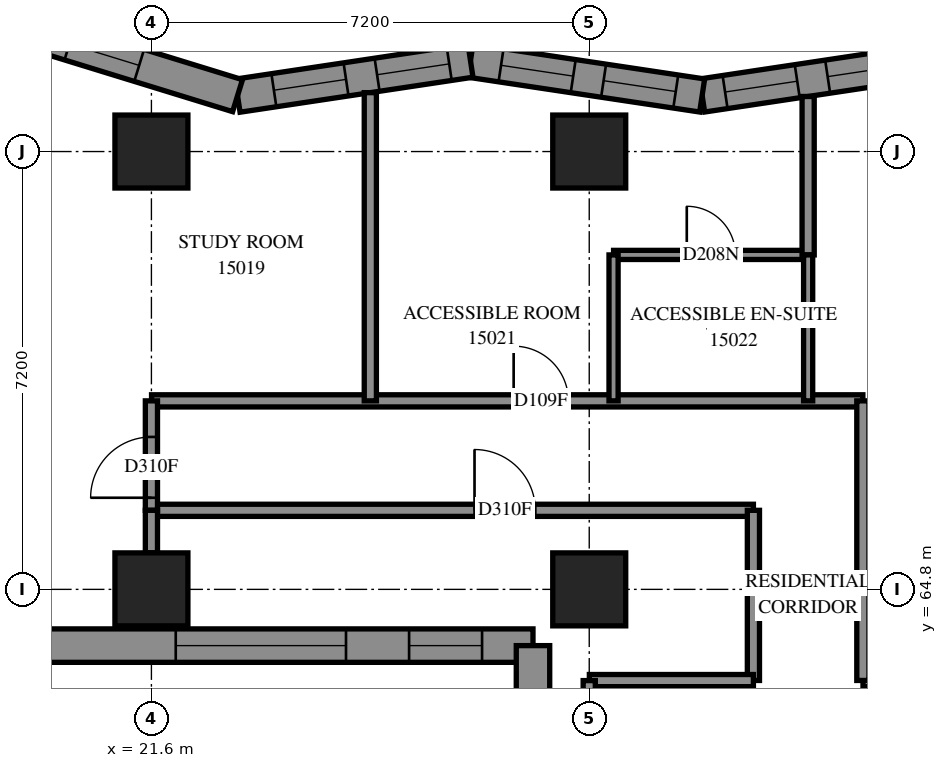
"""IFC4 building model, lengths in metres.
Left out: names, types, materials, properties, quantities, classifications, styles, units other than length and angle.
Written with IfcOpenShell. Run it as: python <this file> out.ifc"""

import sys

from ifc_helpers import new_model, si_unit, direction, frame, frame_2d, origin, origin_2d, place, context, subcontext, project, spatial, polyline, rectangle, outline, extrude, element, fill, save


model = new_model("IFC4")
c1 = context("Model", 3, precision=1e-05, world=origin(), true_north=direction((0.0, 1.0)))
c2 = subcontext(c1, "Body", "Model", "MODEL_VIEW")
j1 = project(units=[si_unit("LENGTHUNIT", "METRE"), si_unit("PLANEANGLEUNIT", "RADIAN")], contexts=[c1])
p1 = place(None, origin())
s1 = spatial("IfcSite", under=j1, at=p1, CompositionType="ELEMENT")
p2 = place(p1, origin())
s2 = spatial("IfcBuilding", under=s1, at=p2, CompositionType="ELEMENT")
p3 = place(p2, frame((0.0, 0.0, 57.6)))
s3 = spatial("IfcBuildingStorey", under=s2, at=p3, CompositionType="ELEMENT", Elevation=57.6)
for number, where, z_axis, x_axis in (
    (1, (21.6, 64.8, 0.0), (0.0, 0.0, 1.0), (1.0, 0.0, 0.0)),
    (2, (21.6, 72.0, 0.0), (0.0, 0.0, 1.0), (1.0, 0.0, 0.0)),
    (3, (28.8, 64.8, 0.0), (0.0, 0.0, 1.0), (1.0, 0.0, 0.0)),
    (4, (28.8, 72.0, 0.0), (0.0, 0.0, 1.0), (1.0, 0.0, 0.0)),
):
    element("IfcColumn", number, at=place(p3, frame(where, z_axis=z_axis, x_axis=x_axis)), inside=s3, PredefinedType="COLUMN", context=c2, shape_type="SweptSolid", body=[
        extrude(rectangle(XDim=1.2, YDim=1.2, at=origin_2d()), origin(), (0.0, 0.0, 1.0), 3.1),
    ])
p4 = place(p3, frame((34.467, 73.494, 0.0), z_axis=(0.0, 0.0, 1.0), x_axis=(-0.9889150173, -0.1484826202, 0.0)))
e5 = element("IfcWall", 5, at=p4, inside=s3, PredefinedType="SOLIDWALL", context=c2, shape_type="SweptSolid", body=[
    extrude(outline(polyline([(-0.041, -0.275), (3.811, -0.275), (3.894, 0.275), (0.041, 0.275), (-0.041, -0.275)])), origin(), (0.0, 0.0, 1.0), 3.1),
])
p5 = place(p4, frame((0.566, 0.0, 0.5)))
e6 = element("IfcOpeningElement", 6, at=p5, cuts=e5, PredefinedType="OPENING", context=c2, shape_type="SweptSolid", body=[
    extrude(rectangle(XDim=1.2, YDim=2.45, at=frame_2d((0.6, 1.225))), frame((0.0, 0.285, 0.0), z_axis=(0.0, -1.0, 0.0), x_axis=(1.0, 0.0, 0.0)), (0.0, 0.0, 1.0), 0.57),
])
p6 = place(p4, frame((2.271, 0.0, 0.5)))
e7 = element("IfcOpeningElement", 7, at=p6, cuts=e5, PredefinedType="OPENING", context=c2, shape_type="SweptSolid", body=[
    extrude(rectangle(XDim=1.2, YDim=2.45, at=frame_2d((0.6, 1.225))), frame((0.0, 0.285, 0.0), z_axis=(0.0, -1.0, 0.0), x_axis=(1.0, 0.0, 0.0)), (0.0, 0.0, 1.0), 0.57),
])
p7 = place(p3, frame((30.657, 72.922, 0.0), z_axis=(0.0, 0.0, 1.0), x_axis=(-0.9889155896, 0.1484788086, 0.0)))
e8 = element("IfcWall", 8, at=p7, inside=s3, PredefinedType="SOLIDWALL", context=c2, shape_type="SweptSolid", body=[
    extrude(outline(polyline([(0.041, -0.275), (3.894, -0.275), (3.811, 0.275), (-0.041, 0.275), (0.041, -0.275)])), origin(), (0.0, 0.0, 1.0), 3.1),
])
p8 = place(p7, frame((0.439, 0.0, 0.5)))
e9 = element("IfcOpeningElement", 9, at=p8, cuts=e8, PredefinedType="OPENING", context=c2, shape_type="SweptSolid", body=[
    extrude(rectangle(XDim=1.2, YDim=2.45, at=frame_2d((0.6, 1.225))), frame((0.0, 0.285, 0.0), z_axis=(0.0, -1.0, 0.0), x_axis=(1.0, 0.0, 0.0)), (0.0, 0.0, 1.0), 0.57),
])
p9 = place(p7, frame((2.144, 0.0, 0.5)))
e10 = element("IfcOpeningElement", 10, at=p9, cuts=e8, PredefinedType="OPENING", context=c2, shape_type="SweptSolid", body=[
    extrude(rectangle(XDim=1.2, YDim=2.45, at=frame_2d((0.6, 1.225))), frame((0.0, 0.285, 0.0), z_axis=(0.0, -1.0, 0.0), x_axis=(1.0, 0.0, 0.0)), (0.0, 0.0, 1.0), 0.57),
])
p10 = place(p3, frame((26.847, 73.494, 0.0), z_axis=(0.0, 0.0, 1.0), x_axis=(-0.9889175987, -0.1484654269, 0.0)))
e11 = element("IfcWall", 11, at=p10, inside=s3, PredefinedType="SOLIDWALL", context=c2, shape_type="SweptSolid", body=[
    extrude(outline(polyline([(-0.041, -0.275), (3.811, -0.275), (3.936, 0.275), (0.041, 0.275), (-0.041, -0.275)])), origin(), (0.0, 0.0, 1.0), 3.1),
])
p11 = place(p10, frame((0.353, 0.0, 0.5)))
e12 = element("IfcOpeningElement", 12, at=p11, cuts=e11, PredefinedType="OPENING", context=c2, shape_type="SweptSolid", body=[
    extrude(rectangle(XDim=1.2, YDim=2.45, at=frame_2d((0.6, 1.225))), frame((0.0, 0.285, 0.0), z_axis=(0.0, -1.0, 0.0), x_axis=(1.0, 0.0, 0.0)), (0.0, 0.0, 1.0), 0.57),
])
p12 = place(p10, frame((2.07, 0.0, 0.5)))
e13 = element("IfcOpeningElement", 13, at=p12, cuts=e11, PredefinedType="OPENING", context=c2, shape_type="SweptSolid", body=[
    extrude(rectangle(XDim=1.2, YDim=2.45, at=frame_2d((0.6, 1.225))), frame((0.0, 0.285, 0.0), z_axis=(0.0, -1.0, 0.0), x_axis=(1.0, 0.0, 0.0)), (0.0, 0.0, 1.0), 0.57),
])
p13 = place(p3, frame((23.017, 72.919, 0.0), z_axis=(0.0, 0.0, 1.0), x_axis=(-0.9557948878, 0.2940342368, 0.0)))
e14 = element("IfcWall", 14, at=p13, inside=s3, PredefinedType="SOLIDWALL", context=c2, shape_type="SweptSolid", body=[
    extrude(outline(polyline([(0.063, -0.275), (4.048, -0.275), (3.304, 0.275), (-0.063, 0.275), (0.063, -0.275)])), origin(), (0.0, 0.0, 1.0), 3.1),
])
p14 = place(p13, frame((1.693, 0.0, 0.5)))
e15 = element("IfcOpeningElement", 15, at=p14, cuts=e14, PredefinedType="OPENING", context=c2, shape_type="SweptSolid", body=[
    extrude(rectangle(XDim=1.2, YDim=2.45, at=frame_2d((0.6, 1.225))), frame((0.0, 0.285, 0.0), z_axis=(0.0, -1.0, 0.0), x_axis=(1.0, 0.0, 0.0)), (0.0, 0.0, 1.0), 0.57),
])
p15 = place(p3, frame((19.503, 63.875, 0.0), z_axis=(0.0, 0.0, 1.0), x_axis=(1.0, 0.0, 0.0)))
e16 = element("IfcWall", 16, at=p15, inside=s3, PredefinedType="SOLIDWALL", context=c2, shape_type="SweptSolid", body=[
    extrude(outline(polyline([(-0.275, -0.275), (8.097, -0.275), (8.647, 0.275), (0.275, 0.275), (-0.275, -0.275)])), origin(), (0.0, 0.0, 1.0), 3.1),
])
p16 = place(p15, frame((2.497, 0.0, 0.5)))
e17 = element("IfcOpeningElement", 17, at=p16, cuts=e16, PredefinedType="OPENING", context=c2, shape_type="SweptSolid", body=[
    extrude(rectangle(XDim=2.8, YDim=2.45, at=frame_2d((1.4, 1.225))), frame((0.0, 0.285, 0.0), z_axis=(0.0, -1.0, 0.0), x_axis=(1.0, 0.0, 0.0)), (0.0, 0.0, 1.0), 0.57),
])
p17 = place(p15, frame((6.335, 0.0, 0.5)))
e18 = element("IfcOpeningElement", 18, at=p17, cuts=e16, PredefinedType="OPENING", context=c2, shape_type="SweptSolid", body=[
    extrude(rectangle(XDim=1.2, YDim=2.45, at=frame_2d((0.6, 1.225))), frame((0.0, 0.285, 0.0), z_axis=(0.0, -1.0, 0.0), x_axis=(1.0, 0.0, 0.0)), (0.0, 0.0, 1.0), 0.57),
])
p18 = place(p3, frame((27.875, 63.875, 0.0), z_axis=(0.0, 0.0, 1.0), x_axis=(0.0, -1.0, 0.0)))
e19 = element("IfcWall", 19, at=p18, inside=s3, PredefinedType="SOLIDWALL", context=c2, shape_type="SweptSolid", body=[
    extrude(outline(polyline([(0.275, -0.275), (8.647, -0.275), (8.097, 0.275), (-0.275, 0.275), (0.275, -0.275)])), origin(), (0.0, 0.0, 1.0), 3.1),
])
p19 = place(p18, frame((0.838, 0.0, 0.5)))
e20 = element("IfcOpeningElement", 20, at=p19, cuts=e19, PredefinedType="OPENING", context=c2, shape_type="SweptSolid", body=[
    extrude(rectangle(XDim=1.2, YDim=2.45, at=frame_2d((0.6, 1.225))), frame((0.0, 0.285, 0.0), z_axis=(0.0, -1.0, 0.0), x_axis=(1.0, 0.0, 0.0)), (0.0, 0.0, 1.0), 0.57),
])
p20 = place(p18, frame((3.325, 0.0, 0.45)))
e21 = element("IfcOpeningElement", 21, at=p20, cuts=e19, PredefinedType="OPENING", context=c2, shape_type="SweptSolid", body=[
    extrude(rectangle(XDim=1.3, YDim=2.5, at=frame_2d((0.65, 1.25))), frame((0.0, 0.285, 0.0), z_axis=(0.0, -1.0, 0.0), x_axis=(1.0, 0.0, 0.0)), (0.0, 0.0, 1.0), 0.57),
])
p21 = place(p18, frame((4.875, 0.0, 0.45)))
e22 = element("IfcOpeningElement", 22, at=p21, cuts=e19, PredefinedType="OPENING", context=c2, shape_type="SweptSolid", body=[
    extrude(rectangle(XDim=1.0, YDim=2.5, at=frame_2d((0.5, 1.25))), frame((0.0, 0.285, 0.0), z_axis=(0.0, -1.0, 0.0), x_axis=(1.0, 0.0, 0.0)), (0.0, 0.0, 1.0), 0.57),
])
p22 = place(p3, frame((33.302, 63.3, 0.0), z_axis=(0.0, 0.0, 1.0), x_axis=(1.0, 0.0, 0.0)))
e23 = element("IfcWall", 23, at=p22, inside=s3, PredefinedType="PARTITIONING", context=c2, shape_type="SweptSolid", body=[
    extrude(rectangle(XDim=21.798, YDim=0.2, at=frame_2d((10.899, 0.0))), origin(), (0.0, 0.0, 1.0), 3.1),
])
p23 = place(p22, frame((1.091, 0.0, 0.0)))
e24 = element("IfcOpeningElement", 24, at=p23, cuts=e23, PredefinedType="OPENING", context=c2, shape_type="SweptSolid", body=[
    extrude(rectangle(XDim=0.9, YDim=2.1, at=frame_2d((0.45, 1.05))), frame((0.0, 0.11, 0.0), z_axis=(0.0, -1.0, 0.0), x_axis=(1.0, 0.0, 0.0)), (0.0, 0.0, 1.0), 0.22),
])
p24 = place(p22, frame((8.248, 0.0, 0.0)))
e25 = element("IfcOpeningElement", 25, at=p24, cuts=e23, PredefinedType="OPENING", context=c2, shape_type="SweptSolid", body=[
    extrude(rectangle(XDim=0.9, YDim=2.1, at=frame_2d((0.45, 1.05))), frame((0.0, 0.11, 0.0), z_axis=(0.0, -1.0, 0.0), x_axis=(1.0, 0.0, 0.0)), (0.0, 0.0, 1.0), 0.22),
])
p25 = place(p22, frame((15.448, 0.0, 0.0)))
e26 = element("IfcOpeningElement", 26, at=p25, cuts=e23, PredefinedType="OPENING", context=c2, shape_type="SweptSolid", body=[
    extrude(rectangle(XDim=0.9, YDim=2.1, at=frame_2d((0.45, 1.05))), frame((0.0, 0.11, 0.0), z_axis=(0.0, -1.0, 0.0), x_axis=(1.0, 0.0, 0.0)), (0.0, 0.0, 1.0), 0.22),
])
p26 = place(p3, frame((21.602, 67.9, 0.0), z_axis=(0.0, 0.0, 1.0), x_axis=(1.0, 0.0, 0.0)))
e27 = element("IfcWall", 27, at=p26, inside=s3, PredefinedType="PARTITIONING", context=c2, shape_type="SweptSolid", body=[
    extrude(rectangle(XDim=11.698, YDim=0.2, at=frame_2d((5.849, 0.0))), origin(), (0.0, 0.0, 1.0), 3.1),
])
p27 = place(p26, frame((5.955, 0.0, 0.0)))
e28 = element("IfcOpeningElement", 28, at=p27, cuts=e27, PredefinedType="OPENING", context=c2, shape_type="SweptSolid", body=[
    extrude(rectangle(XDim=0.9, YDim=2.1, at=frame_2d((0.45, 1.05))), frame((0.0, 0.11, 0.0), z_axis=(0.0, -1.0, 0.0), x_axis=(1.0, 0.0, 0.0)), (0.0, 0.0, 1.0), 0.22),
])
p28 = place(p3, frame((21.6, 66.1, 0.0), z_axis=(0.0, 0.0, 1.0), x_axis=(1.0, 0.0, 0.0)))
e29 = element("IfcWall", 29, at=p28, inside=s3, PredefinedType="PARTITIONING", context=c2, shape_type="SweptSolid", body=[
    extrude(rectangle(XDim=9.9, YDim=0.2, at=frame_2d((4.95, 0.0))), origin(), (0.0, 0.0, 1.0), 3.1),
])
p29 = place(p28, frame((5.314, 0.0, 0.0)))
e30 = element("IfcOpeningElement", 30, at=p29, cuts=e29, PredefinedType="OPENING", context=c2, shape_type="SweptSolid", body=[
    extrude(rectangle(XDim=1.0, YDim=2.1, at=frame_2d((0.5, 1.05))), frame((0.0, 0.11, 0.0), z_axis=(0.0, -1.0, 0.0), x_axis=(1.0, 0.0, 0.0)), (0.0, 0.0, 1.0), 0.22),
])
p30 = place(p3, frame((25.2, 67.9, 0.0), z_axis=(0.0, 0.0, 1.0), x_axis=(0.0, 1.0, 0.0)))
e31 = element("IfcWall", 31, at=p30, inside=s3, PredefinedType="PARTITIONING", context=c2, shape_type="SweptSolid", body=[
    extrude(rectangle(XDim=5.069, YDim=0.2, at=frame_2d((2.534, 0.0))), origin(), (0.0, 0.0, 1.0), 3.1),
])
p31 = place(p3, frame((33.3, 63.302, 0.0), z_axis=(0.0, 0.0, 1.0), x_axis=(0.0, 1.0, 0.0)))
e32 = element("IfcWall", 32, at=p31, inside=s3, PredefinedType="PARTITIONING", context=c2, shape_type="SweptSolid", body=[
    extrude(rectangle(XDim=4.598, YDim=0.2, at=frame_2d((2.299, 0.0))), origin(), (0.0, 0.0, 1.0), 3.1),
])
p32 = place(p3, frame((29.2, 70.3, 0.0), z_axis=(0.0, 0.0, 1.0), x_axis=(1.0, 0.0, 0.0)))
e33 = element("IfcWall", 33, at=p32, inside=s3, PredefinedType="PARTITIONING", context=c2, shape_type="SweptSolid", body=[
    extrude(rectangle(XDim=3.2, YDim=0.15, at=frame_2d((1.6, 0.0))), origin(), (0.0, 0.0, 1.0), 3.1),
])
p33 = place(p32, frame((1.204, 0.0, 0.0)))
e34 = element("IfcOpeningElement", 34, at=p33, cuts=e33, PredefinedType="OPENING", context=c2, shape_type="SweptSolid", body=[
    extrude(rectangle(XDim=0.8, YDim=2.1, at=frame_2d((0.4, 1.05))), frame((0.0, 0.085, 0.0), z_axis=(0.0, -1.0, 0.0), x_axis=(1.0, 0.0, 0.0)), (0.0, 0.0, 1.0), 0.17),
])
p34 = place(p3, frame((31.5, 63.302, 0.0), z_axis=(0.0, 0.0, 1.0), x_axis=(0.0, 1.0, 0.0)))
e35 = element("IfcWall", 35, at=p34, inside=s3, PredefinedType="PARTITIONING", context=c2, shape_type="SweptSolid", body=[
    extrude(rectangle(XDim=2.798, YDim=0.2, at=frame_2d((1.399, 0.0))), origin(), (0.0, 0.0, 1.0), 3.1),
])
p35 = place(p3, frame((28.802, 63.3, 0.0), z_axis=(0.0, 0.0, 1.0), x_axis=(1.0, 0.0, 0.0)))
e36 = element("IfcWall", 36, at=p35, inside=s3, PredefinedType="PARTITIONING", context=c2, shape_type="SweptSolid", body=[
    extrude(rectangle(XDim=2.698, YDim=0.2, at=frame_2d((1.349, 0.0))), origin(), (0.0, 0.0, 1.0), 3.1),
])
p36 = place(p3, frame((32.4, 70.3, 0.0), z_axis=(0.0, 0.0, 1.0), x_axis=(0.0, 1.0, 0.0)))
e37 = element("IfcWall", 37, at=p36, inside=s3, PredefinedType="PARTITIONING", context=c2, shape_type="SweptSolid", body=[
    extrude(rectangle(XDim=2.606, YDim=0.2, at=frame_2d((1.303, 0.0))), origin(), (0.0, 0.0, 1.0), 3.1),
])
for number, where, z_axis, x_axis in (
    (38, (29.2, 67.9, 0.0), (0.0, 0.0, 1.0), (0.0, 1.0, 0.0)),
    (39, (32.4, 67.9, 0.0), (0.0, 0.0, 1.0), (0.0, 1.0, 0.0)),
):
    element("IfcWall", number, at=place(p3, frame(where, z_axis=z_axis, x_axis=x_axis)), inside=s3, PredefinedType="PARTITIONING", context=c2, shape_type="SweptSolid", body=[
        extrude(rectangle(XDim=2.4, YDim=0.15, at=frame_2d((1.2, 0.0))), origin(), (0.0, 0.0, 1.0), 3.1),
    ])
p37 = place(p3, frame((21.6, 66.1, 0.0), z_axis=(0.0, 0.0, 1.0), x_axis=(0.0, 1.0, 0.0)))
e40 = element("IfcWall", 40, at=p37, inside=s3, PredefinedType="PARTITIONING", context=c2, shape_type="SweptSolid", body=[
    extrude(rectangle(XDim=1.8, YDim=0.2, at=frame_2d((0.9, 0.0))), origin(), (0.0, 0.0, 1.0), 2.6),
])
p38 = place(p37, frame((0.207, 0.0, 0.0)))
e41 = element("IfcOpeningElement", 41, at=p38, cuts=e40, PredefinedType="OPENING", context=c2, shape_type="SweptSolid", body=[
    extrude(rectangle(XDim=1.0, YDim=2.1, at=frame_2d((0.5, 1.05))), frame((0.0, 0.11, 0.0), z_axis=(0.0, -1.0, 0.0), x_axis=(1.0, 0.0, 0.0)), (0.0, 0.0, 1.0), 0.22),
])
p39 = place(p3, frame((28.8, 61.5, 0.0), z_axis=(0.0, 0.0, 1.0), x_axis=(0.0, 1.0, 0.0)))
e42 = element("IfcWall", 42, at=p39, inside=s3, PredefinedType="PARTITIONING", context=c2, shape_type="SweptSolid", body=[
    extrude(rectangle(XDim=1.8, YDim=0.2, at=frame_2d((0.9, 0.0))), origin(), (0.0, 0.0, 1.0), 2.6),
])
p40 = place(p3, frame((21.6, 65.4, 0.0), z_axis=(0.0, 0.0, 1.0), x_axis=(0.0, 1.0, 0.0)))
e43 = element("IfcWall", 43, at=p40, inside=s3, PredefinedType="PARTITIONING", context=c2, shape_type="SweptSolid", body=[
    extrude(rectangle(XDim=0.7, YDim=0.2, at=frame_2d((0.35, 0.0))), origin(), (0.0, 0.0, 1.0), 2.6),
])
p41 = place(p5, origin())
e44 = element("IfcWindow", 44, at=p41, inside=s3, PartitioningType="SINGLE_PANEL", PredefinedType="WINDOW", context=c2, shape_type="SweptSolid", body=[
    extrude(rectangle(XDim=1.2, YDim=2.45, at=frame_2d((0.6, 1.225))), frame((0.0, 0.155, 0.0), z_axis=(0.0, -1.0, 0.0), x_axis=(1.0, 0.0, 0.0)), (0.0, 0.0, 1.0), 0.06),
])
fill(e6, e44)
p42 = place(p6, origin())
e45 = element("IfcWindow", 45, at=p42, inside=s3, PartitioningType="SINGLE_PANEL", PredefinedType="WINDOW", context=c2, shape_type="SweptSolid", body=[
    extrude(rectangle(XDim=1.2, YDim=2.45, at=frame_2d((0.6, 1.225))), frame((0.0, 0.155, 0.0), z_axis=(0.0, -1.0, 0.0), x_axis=(1.0, 0.0, 0.0)), (0.0, 0.0, 1.0), 0.06),
])
fill(e7, e45)
p43 = place(p8, origin())
e46 = element("IfcWindow", 46, at=p43, inside=s3, PartitioningType="SINGLE_PANEL", PredefinedType="WINDOW", context=c2, shape_type="SweptSolid", body=[
    extrude(rectangle(XDim=1.2, YDim=2.45, at=frame_2d((0.6, 1.225))), frame((0.0, 0.155, 0.0), z_axis=(0.0, -1.0, 0.0), x_axis=(1.0, 0.0, 0.0)), (0.0, 0.0, 1.0), 0.06),
])
fill(e9, e46)
p44 = place(p9, origin())
e47 = element("IfcWindow", 47, at=p44, inside=s3, PartitioningType="SINGLE_PANEL", PredefinedType="WINDOW", context=c2, shape_type="SweptSolid", body=[
    extrude(rectangle(XDim=1.2, YDim=2.45, at=frame_2d((0.6, 1.225))), frame((0.0, 0.155, 0.0), z_axis=(0.0, -1.0, 0.0), x_axis=(1.0, 0.0, 0.0)), (0.0, 0.0, 1.0), 0.06),
])
fill(e10, e47)
p45 = place(p11, origin())
e48 = element("IfcWindow", 48, at=p45, inside=s3, PartitioningType="SINGLE_PANEL", PredefinedType="WINDOW", context=c2, shape_type="SweptSolid", body=[
    extrude(rectangle(XDim=1.2, YDim=2.45, at=frame_2d((0.6, 1.225))), frame((0.0, 0.155, 0.0), z_axis=(0.0, -1.0, 0.0), x_axis=(1.0, 0.0, 0.0)), (0.0, 0.0, 1.0), 0.06),
])
fill(e12, e48)
p46 = place(p12, origin())
e49 = element("IfcWindow", 49, at=p46, inside=s3, PartitioningType="SINGLE_PANEL", PredefinedType="WINDOW", context=c2, shape_type="SweptSolid", body=[
    extrude(rectangle(XDim=1.2, YDim=2.45, at=frame_2d((0.6, 1.225))), frame((0.0, 0.155, 0.0), z_axis=(0.0, -1.0, 0.0), x_axis=(1.0, 0.0, 0.0)), (0.0, 0.0, 1.0), 0.06),
])
fill(e13, e49)
p47 = place(p14, origin())
e50 = element("IfcWindow", 50, at=p47, inside=s3, PartitioningType="SINGLE_PANEL", PredefinedType="WINDOW", context=c2, shape_type="SweptSolid", body=[
    extrude(rectangle(XDim=1.2, YDim=2.45, at=frame_2d((0.6, 1.225))), frame((0.0, 0.155, 0.0), z_axis=(0.0, -1.0, 0.0), x_axis=(1.0, 0.0, 0.0)), (0.0, 0.0, 1.0), 0.06),
])
fill(e15, e50)
p48 = place(p16, origin())
e51 = element("IfcWindow", 51, at=p48, inside=s3, PartitioningType="SINGLE_PANEL", PredefinedType="WINDOW", context=c2, shape_type="SweptSolid", body=[
    extrude(rectangle(XDim=2.8, YDim=2.45, at=frame_2d((1.4, 1.225))), frame((0.0, 0.155, 0.0), z_axis=(0.0, -1.0, 0.0), x_axis=(1.0, 0.0, 0.0)), (0.0, 0.0, 1.0), 0.06),
])
fill(e17, e51)
p49 = place(p17, origin())
e52 = element("IfcWindow", 52, at=p49, inside=s3, PartitioningType="SINGLE_PANEL", PredefinedType="WINDOW", context=c2, shape_type="SweptSolid", body=[
    extrude(rectangle(XDim=1.2, YDim=2.45, at=frame_2d((0.6, 1.225))), frame((0.0, 0.155, 0.0), z_axis=(0.0, -1.0, 0.0), x_axis=(1.0, 0.0, 0.0)), (0.0, 0.0, 1.0), 0.06),
])
fill(e18, e52)
p50 = place(p38, origin())
e53 = element("IfcDoor", 53, at=p50, inside=s3, OperationType="SINGLE_SWING_RIGHT", PredefinedType="DOOR", context=c2, shape_type="SweptSolid", body=[
    extrude(rectangle(XDim=1.0, YDim=2.1, at=frame_2d((0.5, 1.05))), frame((0.0, 0.025, 0.0), z_axis=(0.0, -1.0, 0.0), x_axis=(1.0, 0.0, 0.0)), (0.0, 0.0, 1.0), 0.05),
])
fill(e41, e53)
p51 = place(p29, origin())
e54 = element("IfcDoor", 54, at=p51, inside=s3, OperationType="SINGLE_SWING_LEFT", PredefinedType="DOOR", context=c2, shape_type="SweptSolid", body=[
    extrude(rectangle(XDim=1.0, YDim=2.1, at=frame_2d((0.5, 1.05))), frame((0.0, 0.025, 0.0), z_axis=(0.0, -1.0, 0.0), x_axis=(1.0, 0.0, 0.0)), (0.0, 0.0, 1.0), 0.05),
])
fill(e30, e54)
p52 = place(p27, origin())
e55 = element("IfcDoor", 55, at=p52, inside=s3, OperationType="SINGLE_SWING_LEFT", PredefinedType="DOOR", context=c2, shape_type="SweptSolid", body=[
    extrude(rectangle(XDim=0.9, YDim=2.1, at=frame_2d((0.45, 1.05))), frame((0.0, 0.025, 0.0), z_axis=(0.0, -1.0, 0.0), x_axis=(1.0, 0.0, 0.0)), (0.0, 0.0, 1.0), 0.05),
])
fill(e28, e55)
p53 = place(p33, origin())
e56 = element("IfcDoor", 56, at=p53, inside=s3, OperationType="SINGLE_SWING_RIGHT", PredefinedType="DOOR", context=c2, shape_type="SweptSolid", body=[
    extrude(rectangle(XDim=0.8, YDim=2.1, at=frame_2d((0.4, 1.05))), frame((0.0, 0.025, 0.0), z_axis=(0.0, -1.0, 0.0), x_axis=(1.0, 0.0, 0.0)), (0.0, 0.0, 1.0), 0.05),
])
fill(e34, e56)
save(model, sys.argv[1])
